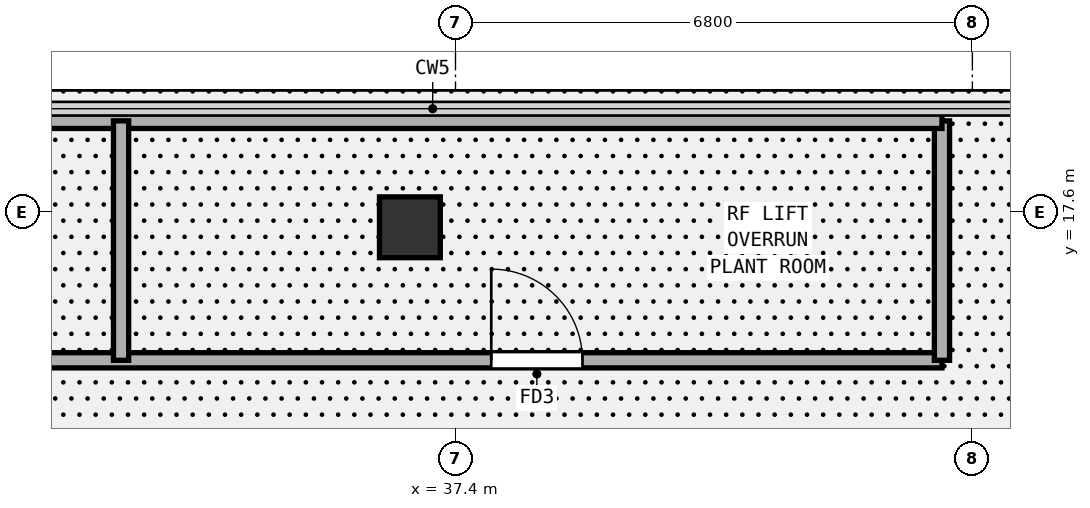
"""IFC4 building model, lengths in metres.
Left out: names, types, materials, properties, quantities, classifications, styles, units other than length and angle.
Written with IfcOpenShell. Run it as: python <this file> out.ifc"""

import sys

from ifc_helpers import new_model, si_unit, direction, frame, frame_2d, origin, origin_2d, place, context, subcontext, project, spatial, rectangle, extrude, element, fill, save


model = new_model("IFC4")
c1 = context("Model", 3, precision=1e-05, world=origin(), true_north=direction((0.0, 1.0)))
c2 = subcontext(c1, "Body", "Model", "MODEL_VIEW")
j1 = project(units=[si_unit("LENGTHUNIT", "METRE"), si_unit("PLANEANGLEUNIT", "RADIAN")], contexts=[c1])
p1 = place(None, origin())
s1 = spatial("IfcSite", under=j1, at=p1, CompositionType="ELEMENT")
p2 = place(p1, origin())
s2 = spatial("IfcBuilding", under=s1, at=p2, CompositionType="ELEMENT")
p3 = place(p2, frame((0.0, 0.0, 360.4)))
s3 = spatial("IfcBuildingStorey", under=s2, at=p3, CompositionType="ELEMENT", Elevation=360.4)
p4 = place(p3, frame((36.8, 17.4, 0.0), z_axis=(0.0, 0.0, 1.0), x_axis=(1.0, 0.0, 0.0)))
e1 = element("IfcColumn", 1, at=p4, inside=s3, PredefinedType="COLUMN", context=c2, shape_type="SweptSolid", body=[
    extrude(rectangle(XDim=0.8, YDim=0.8, at=origin_2d()), origin(), (0.0, 0.0, 1.0), 5.094),
])
p5 = place(p3, frame((23.6, 15.65, 0.0), z_axis=(0.0, 0.0, 1.0), x_axis=(1.0, 0.0, 0.0)))
e2 = element("IfcWall", 2, at=p5, inside=s3, PredefinedType="PARTITIONING", context=c2, shape_type="SweptSolid", body=[
    extrude(rectangle(XDim=20.2, YDim=0.2, at=frame_2d((10.1, 0.0))), origin(), (0.0, 0.0, 1.0), 4.48),
])
p6 = place(p5, frame((4.414, 0.0, 0.0)))
e3 = element("IfcOpeningElement", 3, at=p6, cuts=e2, PredefinedType="OPENING", context=c2, shape_type="SweptSolid", body=[
    extrude(rectangle(XDim=1.2, YDim=2.25, at=frame_2d((0.6, 1.125))), frame((0.0, 0.11, 0.0), z_axis=(0.0, -1.0, 0.0), x_axis=(1.0, 0.0, 0.0)), (0.0, 0.0, 1.0), 0.22),
])
p7 = place(p5, frame((14.271, 0.0, 0.0)))
e4 = element("IfcOpeningElement", 4, at=p7, cuts=e2, PredefinedType="OPENING", context=c2, shape_type="SweptSolid", body=[
    extrude(rectangle(XDim=1.2, YDim=2.25, at=frame_2d((0.6, 1.125))), frame((0.0, 0.11, 0.0), z_axis=(0.0, -1.0, 0.0), x_axis=(1.0, 0.0, 0.0)), (0.0, 0.0, 1.0), 0.22),
])
p8 = place(p3, frame((43.8, 15.65, 0.0), z_axis=(0.0, 0.0, 1.0), x_axis=(0.0, 1.0, 0.0)))
e5 = element("IfcWall", 5, at=p8, inside=s3, PredefinedType="PARTITIONING", context=c2, shape_type="SweptSolid", body=[
    extrude(rectangle(XDim=3.15, YDim=0.2, at=frame_2d((1.575, 0.0))), origin(), (0.0, 0.0, 1.0), 4.48),
])
p9 = place(p3, frame((23.6, 18.8, 0.0), z_axis=(0.0, 0.0, 1.0), x_axis=(1.0, 0.0, 0.0)))
e6 = element("IfcWall", 6, at=p9, inside=s3, PredefinedType="PARTITIONING", context=c2, shape_type="SweptSolid", body=[
    extrude(rectangle(XDim=20.2, YDim=0.2, at=frame_2d((10.1, 0.0))), origin(), (0.0, 0.0, 1.0), 4.48),
])
p10 = place(p3, frame((33.0, 15.65, 0.0), z_axis=(0.0, 0.0, 1.0), x_axis=(0.0, 1.0, 0.0)))
e7 = element("IfcWall", 7, at=p10, inside=s3, PredefinedType="PARTITIONING", context=c2, shape_type="SweptSolid", body=[
    extrude(rectangle(XDim=3.15, YDim=0.2, at=frame_2d((1.575, 0.0))), origin(), (0.0, 0.0, 1.0), 4.48),
])
p11 = place(p7, origin())
e8 = element("IfcDoor", 8, at=p11, inside=s3, OperationType="SINGLE_SWING_LEFT", PredefinedType="DOOR", context=c2, shape_type="SweptSolid", body=[
    extrude(rectangle(XDim=1.2, YDim=2.25, at=frame_2d((0.6, 1.125))), frame((0.0, 0.025, 0.0), z_axis=(0.0, -1.0, 0.0), x_axis=(1.0, 0.0, 0.0)), (0.0, 0.0, 1.0), 0.05),
])
fill(e4, e8)
save(model, sys.argv[1])
